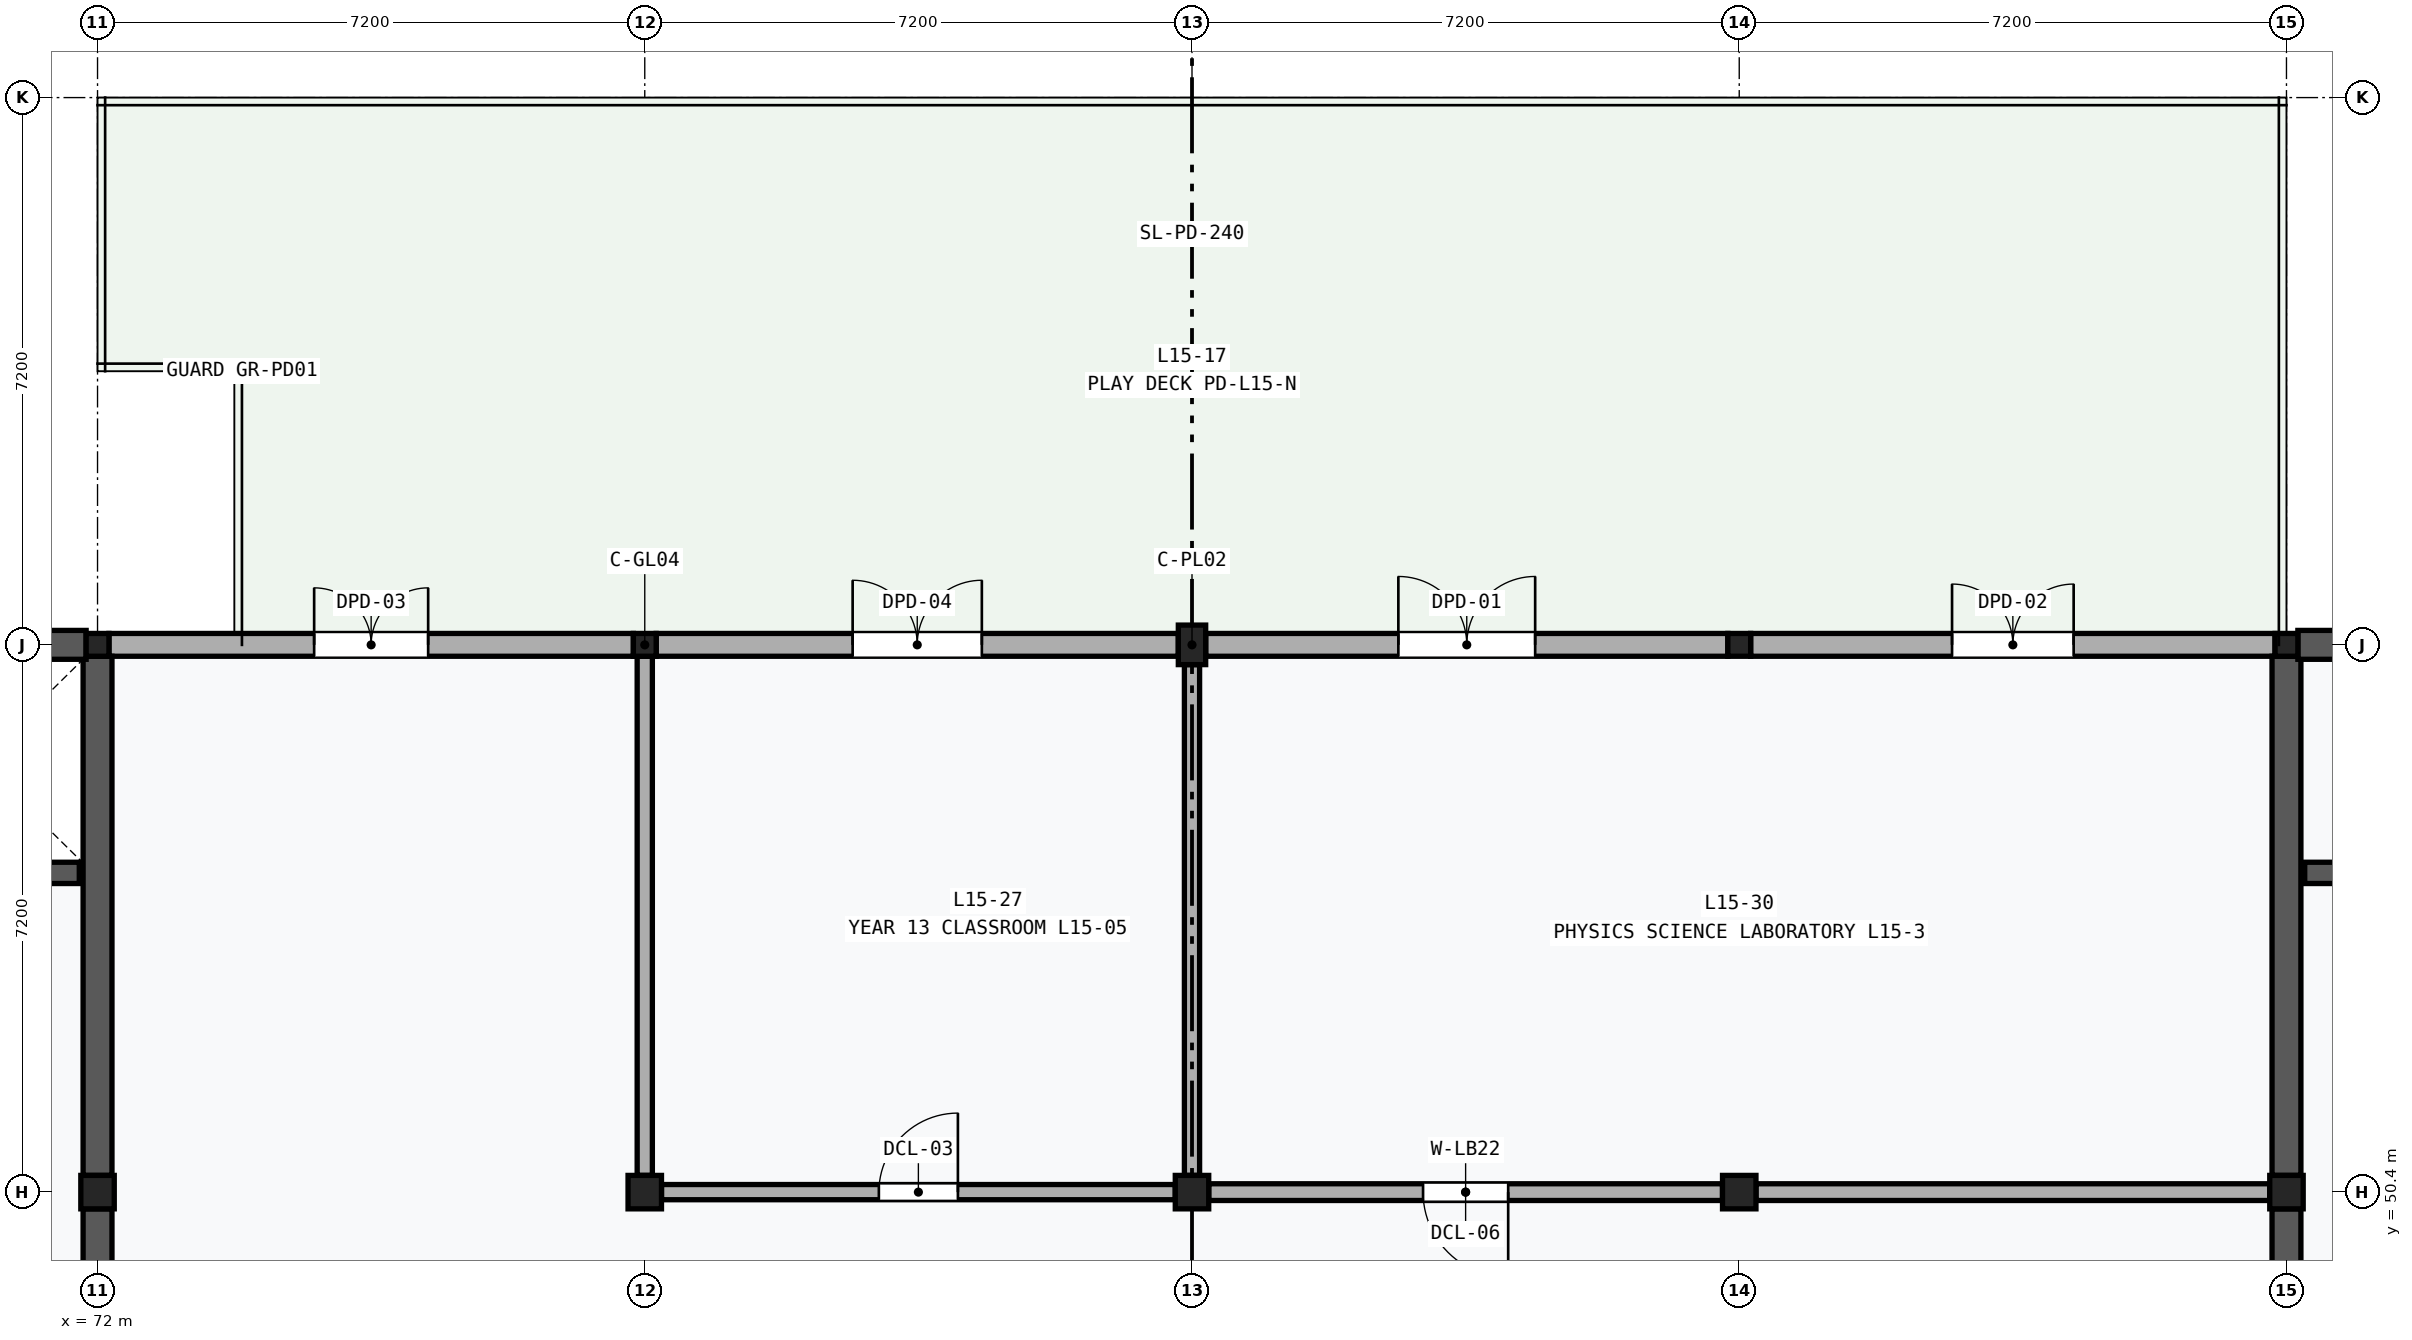
"""IFC4 building model, lengths in metres.
Left out: names, types, materials, properties, quantities, classifications, styles, units other than length and angle.
Written with IfcOpenShell. Run it as: python <this file> out.ifc"""

import sys

from ifc_helpers import new_model, si_unit, direction, frame, frame_2d, origin, origin_2d, place, context, subcontext, project, spatial, rectangle, extrude, element, fill, save


model = new_model("IFC4")
c1 = context("Model", 3, precision=1e-05, world=origin(), true_north=direction((0.0, 1.0)))
c2 = subcontext(c1, "Body", "Model", "MODEL_VIEW")
j1 = project(units=[si_unit("LENGTHUNIT", "METRE"), si_unit("PLANEANGLEUNIT", "RADIAN")], contexts=[c1])
p1 = place(None, origin())
s1 = spatial("IfcSite", under=j1, at=p1, CompositionType="ELEMENT")
p2 = place(p1, origin())
s2 = spatial("IfcBuilding", under=s1, at=p2, CompositionType="ELEMENT")
p3 = place(p2, frame((0.0, 0.0, 63.0)))
s3 = spatial("IfcBuildingStorey", under=s2, at=p3, CompositionType="ELEMENT", Elevation=63.0)
p4 = place(p3, frame((72.0, 50.4, 0.0), z_axis=(0.0, 0.0, 1.0), x_axis=(1.0, 0.0, 0.0)))
e1 = element("IfcColumn", 1, at=p4, inside=s3, PredefinedType="COLUMN", context=c2, shape_type="SweptSolid", body=[
    extrude(rectangle(XDim=0.44, YDim=0.44, at=origin_2d()), origin(), (0.0, 0.0, 1.0), 4.2),
])
p5 = place(p3, frame((72.0, 57.6, 0.0), z_axis=(0.0, 0.0, 1.0), x_axis=(1.0, 0.0, 0.0)))
e2 = element("IfcColumn", 2, at=p5, inside=s3, PredefinedType="COLUMN", context=c2, shape_type="SweptSolid", body=[
    extrude(rectangle(XDim=0.3, YDim=0.3, at=origin_2d()), origin(), (0.0, 0.0, 1.0), 4.2),
])
p6 = place(p3, frame((79.2, 50.4, 0.0), z_axis=(0.0, 0.0, 1.0), x_axis=(1.0, 0.0, 0.0)))
e3 = element("IfcColumn", 3, at=p6, inside=s3, PredefinedType="COLUMN", context=c2, shape_type="SweptSolid", body=[
    extrude(rectangle(XDim=0.44, YDim=0.44, at=origin_2d()), origin(), (0.0, 0.0, 1.0), 4.2),
])
p7 = place(p3, frame((79.2, 57.6, 0.0), z_axis=(0.0, 0.0, 1.0), x_axis=(1.0, 0.0, 0.0)))
e4 = element("IfcColumn", 4, at=p7, inside=s3, PredefinedType="COLUMN", context=c2, shape_type="SweptSolid", body=[
    extrude(rectangle(XDim=0.3, YDim=0.3, at=origin_2d()), origin(), (0.0, 0.0, 1.0), 4.2),
])
p8 = place(p3, frame((86.4, 50.4, 0.0), z_axis=(0.0, 0.0, 1.0), x_axis=(1.0, 0.0, 0.0)))
e5 = element("IfcColumn", 5, at=p8, inside=s3, PredefinedType="COLUMN", context=c2, shape_type="SweptSolid", body=[
    extrude(rectangle(XDim=0.44, YDim=0.44, at=origin_2d()), origin(), (0.0, 0.0, 1.0), 4.2),
])
p9 = place(p3, frame((86.4, 57.6, 0.0), z_axis=(0.0, 0.0, 1.0), x_axis=(1.0, 0.0, 0.0)))
e6 = element("IfcColumn", 6, at=p9, inside=s3, PredefinedType="PILASTER", context=c2, shape_type="SweptSolid", body=[
    extrude(rectangle(XDim=0.36, YDim=0.52, at=origin_2d()), origin(), (0.0, 0.0, 1.0), 4.2),
])
p10 = place(p3, frame((93.6, 50.4, 0.0), z_axis=(0.0, 0.0, 1.0), x_axis=(1.0, 0.0, 0.0)))
e7 = element("IfcColumn", 7, at=p10, inside=s3, PredefinedType="COLUMN", context=c2, shape_type="SweptSolid", body=[
    extrude(rectangle(XDim=0.44, YDim=0.44, at=origin_2d()), origin(), (0.0, 0.0, 1.0), 4.2),
])
p11 = place(p3, frame((93.6, 57.6, 0.0), z_axis=(0.0, 0.0, 1.0), x_axis=(1.0, 0.0, 0.0)))
e8 = element("IfcColumn", 8, at=p11, inside=s3, PredefinedType="COLUMN", context=c2, shape_type="SweptSolid", body=[
    extrude(rectangle(XDim=0.3, YDim=0.3, at=origin_2d()), origin(), (0.0, 0.0, 1.0), 4.2),
])
p12 = place(p3, frame((100.8, 50.4, 0.0), z_axis=(0.0, 0.0, 1.0), x_axis=(1.0, 0.0, 0.0)))
e9 = element("IfcColumn", 9, at=p12, inside=s3, PredefinedType="COLUMN", context=c2, shape_type="SweptSolid", body=[
    extrude(rectangle(XDim=0.44, YDim=0.44, at=origin_2d()), origin(), (0.0, 0.0, 1.0), 4.2),
])
p13 = place(p3, frame((100.8, 57.6, 0.0), z_axis=(0.0, 0.0, 1.0), x_axis=(1.0, 0.0, 0.0)))
e10 = element("IfcColumn", 10, at=p13, inside=s3, PredefinedType="COLUMN", context=c2, shape_type="SweptSolid", body=[
    extrude(rectangle(XDim=0.3, YDim=0.3, at=origin_2d()), origin(), (0.0, 0.0, 1.0), 4.2),
])
p14 = place(p3, frame((72.15, 57.6, 0.0), z_axis=(0.0, 0.0, 1.0), x_axis=(1.0, 0.0, 0.0)))
e11 = element("IfcWall", 11, at=p14, inside=s3, PredefinedType="SOLIDWALL", context=c2, shape_type="SweptSolid", body=[
    extrude(rectangle(XDim=6.9, YDim=0.3, at=frame_2d((3.45, 0.0))), origin(), (0.0, 0.0, 1.0), 3.39),
])
p15 = place(p14, frame((2.7, 0.0, 0.0)))
e12 = element("IfcOpeningElement", 12, at=p15, cuts=e11, PredefinedType="OPENING", context=c2, shape_type="SweptSolid", body=[
    extrude(rectangle(XDim=1.5, YDim=2.15, at=frame_2d((0.75, 1.075))), frame((0.0, 0.162, 0.0), z_axis=(0.0, -1.0, 0.0), x_axis=(1.0, 0.0, 0.0)), (0.0, 0.0, 1.0), 0.324),
])
p16 = place(p3, frame((79.35, 57.6, 0.0), z_axis=(0.0, 0.0, 1.0), x_axis=(1.0, 0.0, 0.0)))
e13 = element("IfcWall", 13, at=p16, inside=s3, PredefinedType="SOLIDWALL", context=c2, shape_type="SweptSolid", body=[
    extrude(rectangle(XDim=6.87, YDim=0.3, at=frame_2d((3.435, 0.0))), origin(), (0.0, 0.0, 1.0), 3.39),
])
p17 = place(p16, frame((2.585, 0.0, 0.0)))
e14 = element("IfcOpeningElement", 14, at=p17, cuts=e13, PredefinedType="OPENING", context=c2, shape_type="SweptSolid", body=[
    extrude(rectangle(XDim=1.7, YDim=2.2, at=frame_2d((0.85, 1.1))), frame((0.0, 0.162, 0.0), z_axis=(0.0, -1.0, 0.0), x_axis=(1.0, 0.0, 0.0)), (0.0, 0.0, 1.0), 0.324),
])
p18 = place(p3, frame((86.58, 57.6, 0.0), z_axis=(0.0, 0.0, 1.0), x_axis=(1.0, 0.0, 0.0)))
e15 = element("IfcWall", 15, at=p18, inside=s3, PredefinedType="SOLIDWALL", context=c2, shape_type="SweptSolid", body=[
    extrude(rectangle(XDim=6.87, YDim=0.3, at=frame_2d((3.435, 0.0))), origin(), (0.0, 0.0, 1.0), 3.39),
])
p19 = place(p18, frame((2.535, 0.0, 0.0)))
e16 = element("IfcOpeningElement", 16, at=p19, cuts=e15, PredefinedType="OPENING", context=c2, shape_type="SweptSolid", body=[
    extrude(rectangle(XDim=1.8, YDim=2.2, at=frame_2d((0.9, 1.1))), frame((0.0, 0.162, 0.0), z_axis=(0.0, -1.0, 0.0), x_axis=(1.0, 0.0, 0.0)), (0.0, 0.0, 1.0), 0.324),
])
p20 = place(p3, frame((93.75, 57.6, 0.0), z_axis=(0.0, 0.0, 1.0), x_axis=(1.0, 0.0, 0.0)))
e17 = element("IfcWall", 17, at=p20, inside=s3, PredefinedType="SOLIDWALL", context=c2, shape_type="SweptSolid", body=[
    extrude(rectangle(XDim=6.9, YDim=0.3, at=frame_2d((3.45, 0.0))), origin(), (0.0, 0.0, 1.0), 3.39),
])
p21 = place(p20, frame((2.65, 0.0, 0.0)))
e18 = element("IfcOpeningElement", 18, at=p21, cuts=e17, PredefinedType="OPENING", context=c2, shape_type="SweptSolid", body=[
    extrude(rectangle(XDim=1.6, YDim=2.2, at=frame_2d((0.8, 1.1))), frame((0.0, 0.162, 0.0), z_axis=(0.0, -1.0, 0.0), x_axis=(1.0, 0.0, 0.0)), (0.0, 0.0, 1.0), 0.324),
])
p22 = place(p3, frame((72.0, 43.42, 0.0), z_axis=(0.0, 0.0, 1.0), x_axis=(0.0, 1.0, 0.0)))
e19 = element("IfcWall", 19, at=p22, inside=s3, PredefinedType="SHEAR", context=c2, shape_type="SweptSolid", body=[
    extrude(rectangle(XDim=6.76, YDim=0.38, at=frame_2d((3.38, 0.0))), origin(), (0.0, 0.0, 1.0), 3.31),
])
p23 = place(p22, frame((2.2, 0.0, 0.0)))
e20 = element("IfcOpeningElement", 20, at=p23, cuts=e19, PredefinedType="OPENING", context=c2, shape_type="SweptSolid", body=[
    extrude(rectangle(XDim=1.6, YDim=2.2, at=frame_2d((0.8, 1.1))), frame((0.0, 0.202, 0.0), z_axis=(0.0, -1.0, 0.0), x_axis=(1.0, 0.0, 0.0)), (0.0, 0.0, 1.0), 0.404),
])
p24 = place(p3, frame((72.0, 50.62, 0.0), z_axis=(0.0, 0.0, 1.0), x_axis=(0.0, 1.0, 0.0)))
e21 = element("IfcWall", 21, at=p24, inside=s3, PredefinedType="SHEAR", context=c2, shape_type="SweptSolid", body=[
    extrude(rectangle(XDim=6.83, YDim=0.38, at=frame_2d((3.415, 0.0))), origin(), (0.0, 0.0, 1.0), 3.31),
])
p25 = place(p3, frame((64.95, 57.6, 0.0), z_axis=(0.0, 0.0, 1.0), x_axis=(1.0, 0.0, 0.0)))
e22 = element("IfcWall", 22, at=p25, inside=s3, PredefinedType="SHEAR", context=c2, shape_type="SweptSolid", body=[
    extrude(rectangle(XDim=6.9, YDim=0.38, at=frame_2d((3.45, 0.0))), origin(), (0.0, 0.0, 1.0), 3.39),
])
p26 = place(p3, frame((69.08, 54.6, 0.0), z_axis=(0.0, 0.0, 1.0), x_axis=(1.0, 0.0, 0.0)))
e23 = element("IfcWall", 23, at=p26, inside=s3, PredefinedType="SHEAR", context=c2, shape_type="SweptSolid", body=[
    extrude(rectangle(XDim=2.68, YDim=0.28, at=frame_2d((1.34, 0.0))), origin(), (0.0, 0.0, 1.0), 3.96),
])
p27 = place(p26, frame((0.765, 0.0, 0.0)))
e24 = element("IfcOpeningElement", 24, at=p27, cuts=e23, PredefinedType="OPENING", context=c2, shape_type="SweptSolid", body=[
    extrude(rectangle(XDim=1.15, YDim=2.2, at=frame_2d((0.575, 1.1))), frame((0.0, 0.152, 0.0), z_axis=(0.0, -1.0, 0.0), x_axis=(1.0, 0.0, 0.0)), (0.0, 0.0, 1.0), 0.304),
])
p28 = place(p3, frame((100.8, 43.42, 0.0), z_axis=(0.0, 0.0, 1.0), x_axis=(0.0, 1.0, 0.0)))
e25 = element("IfcWall", 25, at=p28, inside=s3, PredefinedType="SHEAR", context=c2, shape_type="SweptSolid", body=[
    extrude(rectangle(XDim=6.76, YDim=0.38, at=frame_2d((3.38, 0.0))), origin(), (0.0, 0.0, 1.0), 3.31),
])
p29 = place(p28, frame((2.2, 0.0, 0.0)))
e26 = element("IfcOpeningElement", 26, at=p29, cuts=e25, PredefinedType="OPENING", context=c2, shape_type="SweptSolid", body=[
    extrude(rectangle(XDim=1.6, YDim=2.2, at=frame_2d((0.8, 1.1))), frame((0.0, 0.202, 0.0), z_axis=(0.0, -1.0, 0.0), x_axis=(1.0, 0.0, 0.0)), (0.0, 0.0, 1.0), 0.404),
])
p30 = place(p3, frame((100.8, 50.62, 0.0), z_axis=(0.0, 0.0, 1.0), x_axis=(0.0, 1.0, 0.0)))
e27 = element("IfcWall", 27, at=p30, inside=s3, PredefinedType="SHEAR", context=c2, shape_type="SweptSolid", body=[
    extrude(rectangle(XDim=6.83, YDim=0.38, at=frame_2d((3.415, 0.0))), origin(), (0.0, 0.0, 1.0), 3.31),
])
p31 = place(p3, frame((100.95, 57.6, 0.0), z_axis=(0.0, 0.0, 1.0), x_axis=(1.0, 0.0, 0.0)))
e28 = element("IfcWall", 28, at=p31, inside=s3, PredefinedType="SHEAR", context=c2, shape_type="SweptSolid", body=[
    extrude(rectangle(XDim=6.9, YDim=0.38, at=frame_2d((3.45, 0.0))), origin(), (0.0, 0.0, 1.0), 3.39),
])
p32 = place(p3, frame((101.04, 54.6, 0.0), z_axis=(0.0, 0.0, 1.0), x_axis=(1.0, 0.0, 0.0)))
e29 = element("IfcWall", 29, at=p32, inside=s3, PredefinedType="SHEAR", context=c2, shape_type="SweptSolid", body=[
    extrude(rectangle(XDim=2.68, YDim=0.28, at=frame_2d((1.34, 0.0))), origin(), (0.0, 0.0, 1.0), 3.96),
])
p33 = place(p32, frame((0.65, 0.0, 0.0)))
e30 = element("IfcOpeningElement", 30, at=p33, cuts=e29, PredefinedType="OPENING", context=c2, shape_type="SweptSolid", body=[
    extrude(rectangle(XDim=1.0, YDim=2.15, at=frame_2d((0.5, 1.075))), frame((0.0, 0.152, 0.0), z_axis=(0.0, -1.0, 0.0), x_axis=(1.0, 0.0, 0.0)), (0.0, 0.0, 1.0), 0.304),
])
p34 = place(p3, frame((79.42, 50.4, 0.0), z_axis=(0.0, 0.0, 1.0), x_axis=(1.0, 0.0, 0.0)))
e31 = element("IfcWall", 31, at=p34, inside=s3, PredefinedType="PARTITIONING", context=c2, shape_type="SweptSolid", body=[
    extrude(rectangle(XDim=6.76, YDim=0.2, at=frame_2d((3.38, 0.0))), origin(), (0.0, 0.0, 1.0), 3.31),
])
p35 = place(p34, frame((2.86, 0.0, 0.0)))
e32 = element("IfcOpeningElement", 32, at=p35, cuts=e31, PredefinedType="OPENING", context=c2, shape_type="SweptSolid", body=[
    extrude(rectangle(XDim=1.04, YDim=2.14, at=frame_2d((0.52, 1.07))), frame((0.0, 0.112, 0.0), z_axis=(0.0, -1.0, 0.0), x_axis=(1.0, 0.0, 0.0)), (0.0, 0.0, 1.0), 0.224),
])
p36 = place(p3, frame((79.2, 50.62, 0.0), z_axis=(0.0, 0.0, 1.0), x_axis=(0.0, 1.0, 0.0)))
e33 = element("IfcWall", 33, at=p36, inside=s3, PredefinedType="PARTITIONING", context=c2, shape_type="SweptSolid", body=[
    extrude(rectangle(XDim=6.83, YDim=0.2, at=frame_2d((3.415, 0.0))), origin(), (0.0, 0.0, 1.0), 3.31),
])
p37 = place(p3, frame((86.4, 50.62, 0.0), z_axis=(0.0, 0.0, 1.0), x_axis=(0.0, 1.0, 0.0)))
e34 = element("IfcWall", 34, at=p37, inside=s3, PredefinedType="PARTITIONING", context=c2, shape_type="SweptSolid", body=[
    extrude(rectangle(XDim=6.72, YDim=0.2, at=frame_2d((3.36, 0.0))), origin(), (0.0, 0.0, 1.0), 3.31),
])
p38 = place(p3, frame((86.62, 50.4, 0.0), z_axis=(0.0, 0.0, 1.0), x_axis=(1.0, 0.0, 0.0)))
e35 = element("IfcWall", 35, at=p38, inside=s3, PredefinedType="PARTITIONING", context=c2, shape_type="SweptSolid", body=[
    extrude(rectangle(XDim=6.76, YDim=0.22, at=frame_2d((3.38, 0.0))), origin(), (0.0, 0.0, 1.0), 3.31),
])
p39 = place(p38, frame((2.82, 0.0, 0.0)))
e36 = element("IfcOpeningElement", 36, at=p39, cuts=e35, PredefinedType="OPENING", context=c2, shape_type="SweptSolid", body=[
    extrude(rectangle(XDim=1.12, YDim=2.2, at=frame_2d((0.56, 1.1))), frame((0.0, 0.122, 0.0), z_axis=(0.0, -1.0, 0.0), x_axis=(1.0, 0.0, 0.0)), (0.0, 0.0, 1.0), 0.244),
])
p40 = place(p3, frame((93.82, 50.4, 0.0), z_axis=(0.0, 0.0, 1.0), x_axis=(1.0, 0.0, 0.0)))
e37 = element("IfcWall", 37, at=p40, inside=s3, PredefinedType="PARTITIONING", context=c2, shape_type="SweptSolid", body=[
    extrude(rectangle(XDim=6.76, YDim=0.22, at=frame_2d((3.38, 0.0))), origin(), (0.0, 0.0, 1.0), 3.31),
])
p41 = place(p15, origin())
e38 = element("IfcDoor", 38, at=p41, inside=s3, OperationType="DOUBLE_DOOR_SINGLE_SWING", PredefinedType="DOOR", context=c2, shape_type="SweptSolid", body=[
    extrude(rectangle(XDim=1.5, YDim=2.15, at=frame_2d((0.75, 1.075))), frame((0.0, 0.025, 0.0), z_axis=(0.0, -1.0, 0.0), x_axis=(1.0, 0.0, 0.0)), (0.0, 0.0, 1.0), 0.05),
])
fill(e12, e38)
p42 = place(p17, origin())
e39 = element("IfcDoor", 39, at=p42, inside=s3, OperationType="DOUBLE_DOOR_SINGLE_SWING", PredefinedType="DOOR", context=c2, shape_type="SweptSolid", body=[
    extrude(rectangle(XDim=1.7, YDim=2.2, at=frame_2d((0.85, 1.1))), frame((0.0, 0.025, 0.0), z_axis=(0.0, -1.0, 0.0), x_axis=(1.0, 0.0, 0.0)), (0.0, 0.0, 1.0), 0.05),
])
fill(e14, e39)
p43 = place(p19, origin())
e40 = element("IfcDoor", 40, at=p43, inside=s3, OperationType="DOUBLE_DOOR_SINGLE_SWING", PredefinedType="DOOR", context=c2, shape_type="SweptSolid", body=[
    extrude(rectangle(XDim=1.8, YDim=2.2, at=frame_2d((0.9, 1.1))), frame((0.0, 0.025, 0.0), z_axis=(0.0, -1.0, 0.0), x_axis=(1.0, 0.0, 0.0)), (0.0, 0.0, 1.0), 0.05),
])
fill(e16, e40)
p44 = place(p21, origin())
e41 = element("IfcDoor", 41, at=p44, inside=s3, OperationType="DOUBLE_DOOR_SINGLE_SWING", PredefinedType="DOOR", context=c2, shape_type="SweptSolid", body=[
    extrude(rectangle(XDim=1.6, YDim=2.2, at=frame_2d((0.8, 1.1))), frame((0.0, 0.025, 0.0), z_axis=(0.0, -1.0, 0.0), x_axis=(1.0, 0.0, 0.0)), (0.0, 0.0, 1.0), 0.05),
])
fill(e18, e41)
p45 = place(p35, origin())
e42 = element("IfcDoor", 42, at=p45, inside=s3, OperationType="SINGLE_SWING_RIGHT", PredefinedType="DOOR", context=c2, shape_type="SweptSolid", body=[
    extrude(rectangle(XDim=1.04, YDim=2.14, at=frame_2d((0.52, 1.07))), frame((0.0, 0.025, 0.0), z_axis=(0.0, -1.0, 0.0), x_axis=(1.0, 0.0, 0.0)), (0.0, 0.0, 1.0), 0.05),
])
fill(e32, e42)
p46 = place(p39, frame((1.12, 0.0, 0.0), z_axis=(0.0, 0.0, 1.0), x_axis=(-1.0, 0.0, 0.0)))
e43 = element("IfcDoor", 43, at=p46, inside=s3, OperationType="SINGLE_SWING_LEFT", PredefinedType="DOOR", context=c2, shape_type="SweptSolid", body=[
    extrude(rectangle(XDim=1.12, YDim=2.2, at=frame_2d((0.56, 1.1))), frame((0.0, 0.025, 0.0), z_axis=(0.0, -1.0, 0.0), x_axis=(1.0, 0.0, 0.0)), (0.0, 0.0, 1.0), 0.05),
])
fill(e36, e43)
save(model, sys.argv[1])
